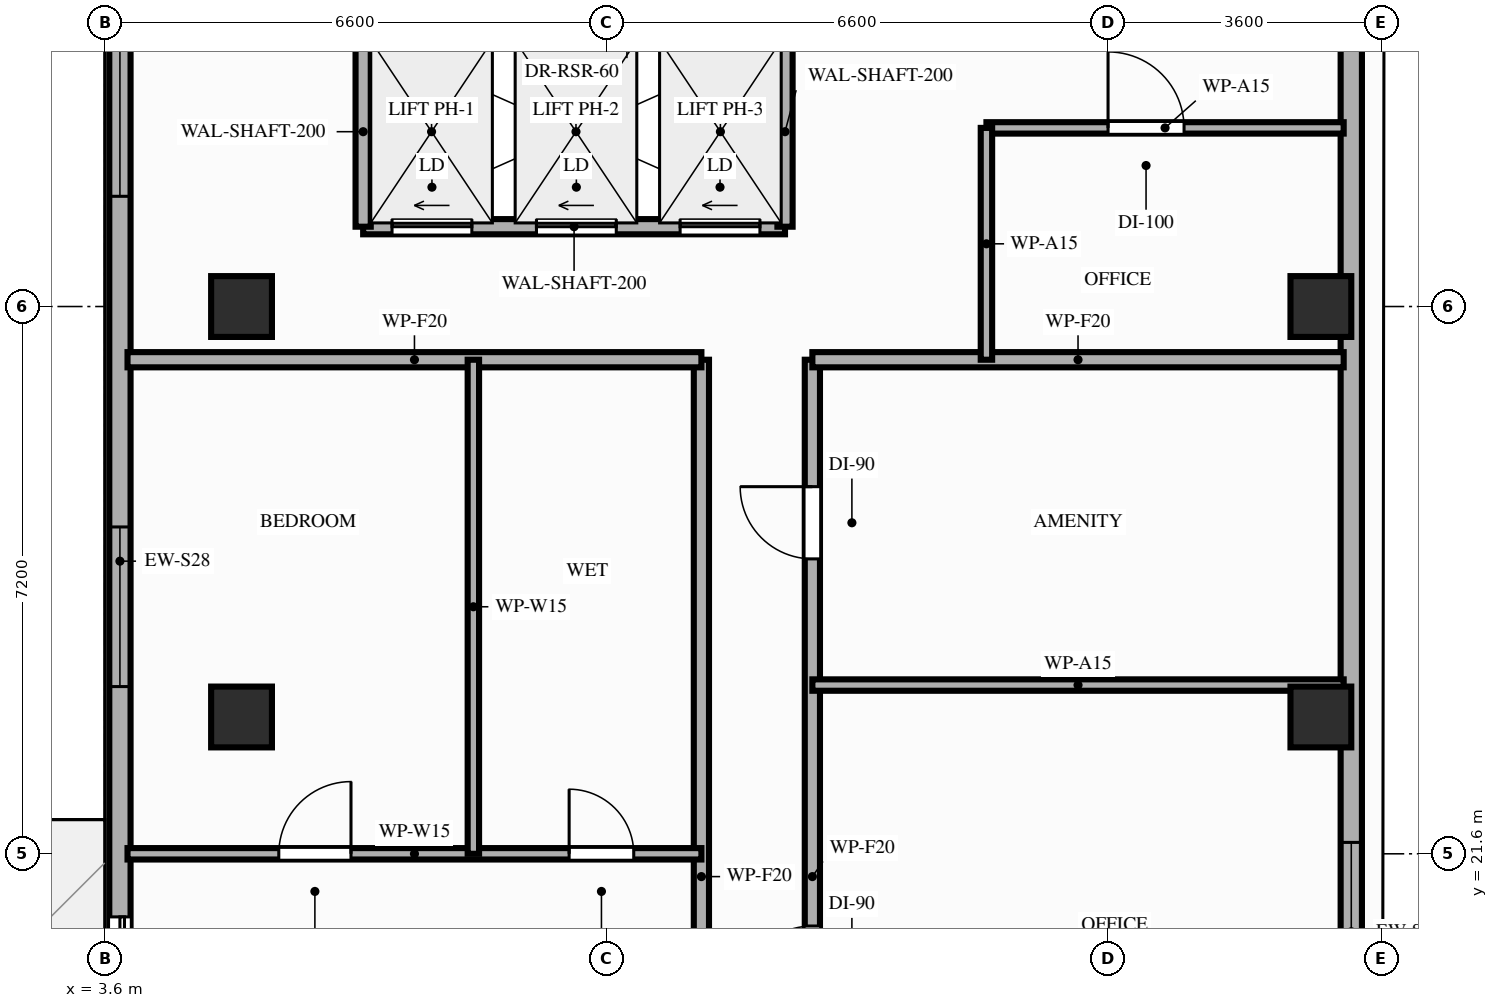
"""IFC4 building model, lengths in metres.
Left out: names, types, materials, properties, quantities, classifications, styles, units other than length and angle.
Written with IfcOpenShell. Run it as: python <this file> out.ifc"""

import sys

from ifc_helpers import new_model, si_unit, direction, frame, frame_2d, origin, origin_2d, place, context, subcontext, project, spatial, rectangle, extrude, element, fill, save


model = new_model("IFC4")
c1 = context("Model", 3, precision=1e-05, world=origin(), true_north=direction((0.0, 1.0)))
c2 = subcontext(c1, "Body", "Model", "MODEL_VIEW")
j1 = project(units=[si_unit("LENGTHUNIT", "METRE"), si_unit("PLANEANGLEUNIT", "RADIAN")], contexts=[c1])
p1 = place(None, origin())
s1 = spatial("IfcSite", under=j1, at=p1, CompositionType="ELEMENT")
p2 = place(p1, origin())
s2 = spatial("IfcBuilding", under=s1, at=p2, CompositionType="ELEMENT")
p3 = place(p2, frame((0.0, 0.0, 224.8)))
s3 = spatial("IfcBuildingStorey", under=s2, at=p3, CompositionType="ELEMENT", Elevation=224.8)
for number, where, z_axis, x_axis in (
    (1, (5.4, 23.4, 0.0), (0.0, 0.0, 1.0), (1.0, 0.0, 0.0)),
    (2, (19.6, 23.4, 0.0), (0.0, 0.0, 1.0), (1.0, 0.0, 0.0)),
    (3, (5.4, 28.8, 0.0), (0.0, 0.0, 1.0), (1.0, 0.0, 0.0)),
    (4, (19.6, 28.8, 0.0), (0.0, 0.0, 1.0), (1.0, 0.0, 0.0)),
):
    element("IfcColumn", number, at=place(p3, frame(where, z_axis=z_axis, x_axis=x_axis)), inside=s3, PredefinedType="COLUMN", context=c2, shape_type="SweptSolid", body=[
        extrude(rectangle(XDim=0.8, YDim=0.8, at=origin_2d()), origin(), (0.0, 0.0, 1.0), 3.2),
    ])
p4 = place(p3, frame((3.8, 42.1, 0.0), z_axis=(0.0, 0.0, 1.0), x_axis=(0.0, -1.0, 0.0)))
e5 = element("IfcWall", 5, at=p4, inside=s3, PredefinedType="STANDARD", context=c2, shape_type="SweptSolid", body=[
    extrude(rectangle(XDim=33.3, YDim=0.28, at=frame_2d((16.65, 0.0))), origin(), (0.0, 0.0, 1.0), 2.71),
])
p5 = place(p4, frame((21.33, 0.0, 0.0)))
e6 = element("IfcOpeningElement", 6, at=p5, cuts=e5, PredefinedType="OPENING", context=c2, shape_type="SweptSolid", body=[
    extrude(rectangle(XDim=1.4, YDim=2.1, at=frame_2d((0.7, 1.05))), frame((0.0, 0.15, 0.0), z_axis=(0.0, -1.0, 0.0), x_axis=(1.0, 0.0, 0.0)), (0.0, 0.0, 1.0), 0.3),
])
p6 = place(p4, frame((29.33, 0.0, 0.85)))
e7 = element("IfcOpeningElement", 7, at=p6, cuts=e5, PredefinedType="OPENING", context=c2, shape_type="SweptSolid", body=[
    extrude(rectangle(XDim=2.1, YDim=1.61, at=frame_2d((1.05, 0.805))), frame((0.0, 0.15, 0.0), z_axis=(0.0, -1.0, 0.0), x_axis=(1.0, 0.0, 0.0)), (0.0, 0.0, 1.0), 0.3),
])
p7 = place(p4, frame((16.2, 0.0, 0.85)))
e8 = element("IfcOpeningElement", 8, at=p7, cuts=e5, PredefinedType="OPENING", context=c2, shape_type="SweptSolid", body=[
    extrude(rectangle(XDim=2.1, YDim=1.61, at=frame_2d((1.05, 0.805))), frame((0.0, 0.15, 0.0), z_axis=(0.0, -1.0, 0.0), x_axis=(1.0, 0.0, 0.0)), (0.0, 0.0, 1.0), 0.3),
])
p8 = place(p4, frame((25.25, 0.0, 0.85)))
e9 = element("IfcOpeningElement", 9, at=p8, cuts=e5, PredefinedType="OPENING", context=c2, shape_type="SweptSolid", body=[
    extrude(rectangle(XDim=2.1, YDim=1.61, at=frame_2d((1.05, 0.805))), frame((0.0, 0.15, 0.0), z_axis=(0.0, -1.0, 0.0), x_axis=(1.0, 0.0, 0.0)), (0.0, 0.0, 1.0), 0.3),
])
p9 = place(p4, frame((9.75, 0.0, 0.85)))
e10 = element("IfcOpeningElement", 10, at=p9, cuts=e5, PredefinedType="OPENING", context=c2, shape_type="SweptSolid", body=[
    extrude(rectangle(XDim=2.1, YDim=1.61, at=frame_2d((1.05, 0.805))), frame((0.0, 0.15, 0.0), z_axis=(0.0, -1.0, 0.0), x_axis=(1.0, 0.0, 0.0)), (0.0, 0.0, 1.0), 0.3),
])
p10 = place(p4, frame((3.65, 0.0, 0.85)))
e11 = element("IfcOpeningElement", 11, at=p10, cuts=e5, PredefinedType="OPENING", context=c2, shape_type="SweptSolid", body=[
    extrude(rectangle(XDim=2.1, YDim=1.61, at=frame_2d((1.05, 0.805))), frame((0.0, 0.15, 0.0), z_axis=(0.0, -1.0, 0.0), x_axis=(1.0, 0.0, 0.0)), (0.0, 0.0, 1.0), 0.3),
])
p11 = place(p3, frame((20.0, 8.8, 0.0), z_axis=(0.0, 0.0, 1.0), x_axis=(0.0, 1.0, 0.0)))
e12 = element("IfcWall", 12, at=p11, inside=s3, PredefinedType="STANDARD", context=c2, shape_type="SweptSolid", body=[
    extrude(rectangle(XDim=23.55, YDim=0.28, at=frame_2d((11.775, 0.0))), origin(), (0.0, 0.0, 1.0), 2.51),
])
p12 = place(p11, frame((4.58, 0.0, 0.85)))
e13 = element("IfcOpeningElement", 13, at=p12, cuts=e12, PredefinedType="OPENING", context=c2, shape_type="SweptSolid", body=[
    extrude(rectangle(XDim=0.8, YDim=1.41, at=frame_2d((0.4, 0.705))), frame((0.0, 0.15, 0.0), z_axis=(0.0, -1.0, 0.0), x_axis=(1.0, 0.0, 0.0)), (0.0, 0.0, 1.0), 0.3),
])
p13 = place(p11, frame((5.95, 0.0, 0.85)))
e14 = element("IfcOpeningElement", 14, at=p13, cuts=e12, PredefinedType="OPENING", context=c2, shape_type="SweptSolid", body=[
    extrude(rectangle(XDim=1.5, YDim=1.41, at=frame_2d((0.75, 0.705))), frame((0.0, 0.15, 0.0), z_axis=(0.0, -1.0, 0.0), x_axis=(1.0, 0.0, 0.0)), (0.0, 0.0, 1.0), 0.3),
])
p14 = place(p11, frame((10.85, 0.0, 0.85)))
e15 = element("IfcOpeningElement", 15, at=p14, cuts=e12, PredefinedType="OPENING", context=c2, shape_type="SweptSolid", body=[
    extrude(rectangle(XDim=2.1, YDim=1.41, at=frame_2d((1.05, 0.705))), frame((0.0, 0.15, 0.0), z_axis=(0.0, -1.0, 0.0), x_axis=(1.0, 0.0, 0.0)), (0.0, 0.0, 1.0), 0.3),
])
p15 = place(p3, frame((7.0, 29.85, 0.0), z_axis=(0.0, 0.0, 1.0), x_axis=(1.0, 0.0, 0.0)))
e16 = element("IfcWall", 16, at=p15, inside=s3, PredefinedType="MOVABLE", context=c2, shape_type="SweptSolid", body=[
    extrude(rectangle(XDim=5.55, YDim=0.2, at=frame_2d((2.775, 0.0))), origin(), (0.0, 0.0, 1.0), 3.02),
])
p16 = place(p15, frame((0.38, 0.0, 0.0)))
e17 = element("IfcOpeningElement", 17, at=p16, cuts=e16, PredefinedType="OPENING", context=c2, shape_type="SweptSolid", body=[
    extrude(rectangle(XDim=1.05, YDim=2.15, at=frame_2d((0.525, 1.075))), frame((0.0, 0.11, 0.0), z_axis=(0.0, -1.0, 0.0), x_axis=(1.0, 0.0, 0.0)), (0.0, 0.0, 1.0), 0.22),
])
p17 = place(p15, frame((2.28, 0.0, 0.0)))
e18 = element("IfcOpeningElement", 18, at=p17, cuts=e16, PredefinedType="OPENING", context=c2, shape_type="SweptSolid", body=[
    extrude(rectangle(XDim=1.05, YDim=2.15, at=frame_2d((0.525, 1.075))), frame((0.0, 0.11, 0.0), z_axis=(0.0, -1.0, 0.0), x_axis=(1.0, 0.0, 0.0)), (0.0, 0.0, 1.0), 0.22),
])
p18 = place(p15, frame((4.17, 0.0, 0.0)))
e19 = element("IfcOpeningElement", 19, at=p18, cuts=e16, PredefinedType="OPENING", context=c2, shape_type="SweptSolid", body=[
    extrude(rectangle(XDim=1.05, YDim=2.15, at=frame_2d((0.525, 1.075))), frame((0.0, 0.11, 0.0), z_axis=(0.0, -1.0, 0.0), x_axis=(1.0, 0.0, 0.0)), (0.0, 0.0, 1.0), 0.22),
])
for number, where, z_axis, x_axis in (
    (20, (7.0, 29.85, 0.0), (0.0, 0.0, 1.0), (0.0, 1.0, 0.0)),
    (21, (12.55, 29.85, 0.0), (0.0, 0.0, 1.0), (0.0, 1.0, 0.0)),
):
    element("IfcWall", number, at=place(p3, frame(where, z_axis=z_axis, x_axis=x_axis)), inside=s3, PredefinedType="MOVABLE", context=c2, shape_type="SweptSolid", body=[
        extrude(rectangle(XDim=2.5, YDim=0.2, at=frame_2d((1.25, 0.0))), origin(), (0.0, 0.0, 1.0), 3.02),
    ])
p19 = place(p3, frame((11.45, 14.5, 0.0), z_axis=(0.0, 0.0, 1.0), x_axis=(0.0, 1.0, 0.0)))
e22 = element("IfcWall", 22, at=p19, inside=s3, PredefinedType="PARTITIONING", context=c2, shape_type="SweptSolid", body=[
    extrude(rectangle(XDim=13.6, YDim=0.2, at=frame_2d((6.8, 0.0))), origin(), (0.0, 0.0, 1.0), 2.51),
])
p20 = place(p19, frame((4.22, 0.0, 0.0)))
e23 = element("IfcOpeningElement", 23, at=p20, cuts=e22, PredefinedType="OPENING", context=c2, shape_type="SweptSolid", body=[
    extrude(rectangle(XDim=0.95, YDim=2.15, at=frame_2d((0.475, 1.075))), frame((0.0, 0.11, 0.0), z_axis=(0.0, -1.0, 0.0), x_axis=(1.0, 0.0, 0.0)), (0.0, 0.0, 1.0), 0.22),
])
p21 = place(p3, frame((12.91, 14.5, 0.0), z_axis=(0.0, 0.0, 1.0), x_axis=(0.0, 1.0, 0.0)))
e24 = element("IfcWall", 24, at=p21, inside=s3, PredefinedType="PARTITIONING", context=c2, shape_type="SweptSolid", body=[
    extrude(rectangle(XDim=13.6, YDim=0.2, at=frame_2d((6.8, 0.0))), origin(), (0.0, 0.0, 1.0), 2.51),
])
p22 = place(p21, frame((0.42, 0.0, 0.0)))
e25 = element("IfcOpeningElement", 25, at=p22, cuts=e24, PredefinedType="OPENING", context=c2, shape_type="SweptSolid", body=[
    extrude(rectangle(XDim=0.95, YDim=2.1, at=frame_2d((0.475, 1.05))), frame((0.0, 0.11, 0.0), z_axis=(0.0, -1.0, 0.0), x_axis=(1.0, 0.0, 0.0)), (0.0, 0.0, 1.0), 0.22),
])
p23 = place(p21, frame((5.2, 0.0, 0.0)))
e26 = element("IfcOpeningElement", 26, at=p23, cuts=e24, PredefinedType="OPENING", context=c2, shape_type="SweptSolid", body=[
    extrude(rectangle(XDim=0.95, YDim=2.15, at=frame_2d((0.475, 1.075))), frame((0.0, 0.11, 0.0), z_axis=(0.0, -1.0, 0.0), x_axis=(1.0, 0.0, 0.0)), (0.0, 0.0, 1.0), 0.22),
])
p24 = place(p21, frame((10.98, 0.0, 0.0)))
e27 = element("IfcOpeningElement", 27, at=p24, cuts=e24, PredefinedType="OPENING", context=c2, shape_type="SweptSolid", body=[
    extrude(rectangle(XDim=0.95, YDim=2.15, at=frame_2d((0.475, 1.075))), frame((0.0, 0.11, 0.0), z_axis=(0.0, -1.0, 0.0), x_axis=(1.0, 0.0, 0.0)), (0.0, 0.0, 1.0), 0.22),
])
p25 = place(p3, frame((3.9, 28.1, 0.0), z_axis=(0.0, 0.0, 1.0), x_axis=(1.0, 0.0, 0.0)))
e28 = element("IfcWall", 28, at=p25, inside=s3, PredefinedType="PARTITIONING", context=c2, shape_type="SweptSolid", body=[
    extrude(rectangle(XDim=7.55, YDim=0.2, at=frame_2d((3.775, 0.0))), origin(), (0.0, 0.0, 1.0), 2.51),
])
p26 = place(p3, frame((12.91, 28.1, 0.0), z_axis=(0.0, 0.0, 1.0), x_axis=(1.0, 0.0, 0.0)))
e29 = element("IfcWall", 29, at=p26, inside=s3, PredefinedType="PARTITIONING", context=c2, shape_type="SweptSolid", body=[
    extrude(rectangle(XDim=6.99, YDim=0.2, at=frame_2d((3.495, 0.0))), origin(), (0.0, 0.0, 1.0), 2.51),
])
p27 = place(p3, frame((15.2, 31.15, 0.0), z_axis=(0.0, 0.0, 1.0), x_axis=(1.0, 0.0, 0.0)))
e30 = element("IfcWall", 30, at=p27, inside=s3, PredefinedType="PARTITIONING", context=c2, shape_type="SweptSolid", body=[
    extrude(rectangle(XDim=4.7, YDim=0.15, at=frame_2d((2.35, 0.0))), origin(), (0.0, 0.0, 1.0), 2.51),
])
p28 = place(p27, frame((1.6, 0.0, 0.0)))
e31 = element("IfcOpeningElement", 31, at=p28, cuts=e30, PredefinedType="OPENING", context=c2, shape_type="SweptSolid", body=[
    extrude(rectangle(XDim=1.0, YDim=2.15, at=frame_2d((0.5, 1.075))), frame((0.0, 0.085, 0.0), z_axis=(0.0, -1.0, 0.0), x_axis=(1.0, 0.0, 0.0)), (0.0, 0.0, 1.0), 0.17),
])
p29 = place(p3, frame((15.2, 28.1, 0.0), z_axis=(0.0, 0.0, 1.0), x_axis=(0.0, 1.0, 0.0)))
e32 = element("IfcWall", 32, at=p29, inside=s3, PredefinedType="PARTITIONING", context=c2, shape_type="SweptSolid", body=[
    extrude(rectangle(XDim=3.05, YDim=0.15, at=frame_2d((1.525, 0.0))), origin(), (0.0, 0.0, 1.0), 2.51),
])
p30 = place(p3, frame((3.9, 21.6, 0.0), z_axis=(0.0, 0.0, 1.0), x_axis=(1.0, 0.0, 0.0)))
e33 = element("IfcWall", 33, at=p30, inside=s3, PredefinedType="PARTITIONING", context=c2, shape_type="SweptSolid", body=[
    extrude(rectangle(XDim=7.55, YDim=0.15, at=frame_2d((3.775, 0.0))), origin(), (0.0, 0.0, 1.0), 2.51),
])
p31 = place(p30, frame((1.99, 0.0, 0.0)))
e34 = element("IfcOpeningElement", 34, at=p31, cuts=e33, PredefinedType="OPENING", context=c2, shape_type="SweptSolid", body=[
    extrude(rectangle(XDim=0.95, YDim=2.15, at=frame_2d((0.475, 1.075))), frame((0.0, 0.085, 0.0), z_axis=(0.0, -1.0, 0.0), x_axis=(1.0, 0.0, 0.0)), (0.0, 0.0, 1.0), 0.17),
])
p32 = place(p30, frame((5.81, 0.0, 0.0)))
e35 = element("IfcOpeningElement", 35, at=p32, cuts=e33, PredefinedType="OPENING", context=c2, shape_type="SweptSolid", body=[
    extrude(rectangle(XDim=0.85, YDim=2.1, at=frame_2d((0.425, 1.05))), frame((0.0, 0.085, 0.0), z_axis=(0.0, -1.0, 0.0), x_axis=(1.0, 0.0, 0.0)), (0.0, 0.0, 1.0), 0.17),
])
p33 = place(p3, frame((8.45, 21.6, 0.0), z_axis=(0.0, 0.0, 1.0), x_axis=(0.0, 1.0, 0.0)))
e36 = element("IfcWall", 36, at=p33, inside=s3, PredefinedType="PARTITIONING", context=c2, shape_type="SweptSolid", body=[
    extrude(rectangle(XDim=6.5, YDim=0.15, at=frame_2d((3.25, 0.0))), origin(), (0.0, 0.0, 1.0), 2.51),
])
p34 = place(p3, frame((12.91, 23.82, 0.0), z_axis=(0.0, 0.0, 1.0), x_axis=(1.0, 0.0, 0.0)))
e37 = element("IfcWall", 37, at=p34, inside=s3, PredefinedType="PARTITIONING", context=c2, shape_type="SweptSolid", body=[
    extrude(rectangle(XDim=6.99, YDim=0.15, at=frame_2d((3.495, 0.0))), origin(), (0.0, 0.0, 1.0), 2.51),
])
p35 = place(p5, origin())
e38 = element("IfcDoor", 38, at=p35, inside=s3, OperationType="SLIDING_TO_RIGHT", PredefinedType="DOOR", context=c2, shape_type="SweptSolid", body=[
    extrude(rectangle(XDim=1.4, YDim=2.1, at=frame_2d((0.7, 1.05))), frame((0.0, 0.025, 0.0), z_axis=(0.0, -1.0, 0.0), x_axis=(1.0, 0.0, 0.0)), (0.0, 0.0, 1.0), 0.05),
])
fill(e6, e38)
p36 = place(p7, origin())
e39 = element("IfcWindow", 39, at=p36, inside=s3, PartitioningType="SINGLE_PANEL", PredefinedType="WINDOW", context=c2, shape_type="SweptSolid", body=[
    extrude(rectangle(XDim=2.1, YDim=1.61, at=frame_2d((1.05, 0.805))), frame((0.0, 0.03, 0.0), z_axis=(0.0, -1.0, 0.0), x_axis=(1.0, 0.0, 0.0)), (0.0, 0.0, 1.0), 0.06),
])
fill(e8, e39)
p37 = place(p9, origin())
e40 = element("IfcWindow", 40, at=p37, inside=s3, PartitioningType="SINGLE_PANEL", PredefinedType="WINDOW", context=c2, shape_type="SweptSolid", body=[
    extrude(rectangle(XDim=2.1, YDim=1.61, at=frame_2d((1.05, 0.805))), frame((0.0, 0.03, 0.0), z_axis=(0.0, -1.0, 0.0), x_axis=(1.0, 0.0, 0.0)), (0.0, 0.0, 1.0), 0.06),
])
fill(e10, e40)
p38 = place(p14, origin())
e41 = element("IfcWindow", 41, at=p38, inside=s3, PartitioningType="SINGLE_PANEL", PredefinedType="WINDOW", context=c2, shape_type="SweptSolid", body=[
    extrude(rectangle(XDim=2.1, YDim=1.41, at=frame_2d((1.05, 0.705))), frame((0.0, 0.03, 0.0), z_axis=(0.0, -1.0, 0.0), x_axis=(1.0, 0.0, 0.0)), (0.0, 0.0, 1.0), 0.06),
])
fill(e15, e41)
p39 = place(p16, origin())
e42 = element("IfcDoor", 42, at=p39, inside=s3, OperationType="SLIDING_TO_LEFT", PredefinedType="DOOR", context=c2, shape_type="SweptSolid", body=[
    extrude(rectangle(XDim=1.05, YDim=2.15, at=frame_2d((0.525, 1.075))), frame((0.0, 0.025, 0.0), z_axis=(0.0, -1.0, 0.0), x_axis=(1.0, 0.0, 0.0)), (0.0, 0.0, 1.0), 0.05),
])
fill(e17, e42)
p40 = place(p17, origin())
e43 = element("IfcDoor", 43, at=p40, inside=s3, OperationType="SLIDING_TO_LEFT", PredefinedType="DOOR", context=c2, shape_type="SweptSolid", body=[
    extrude(rectangle(XDim=1.05, YDim=2.15, at=frame_2d((0.525, 1.075))), frame((0.0, 0.025, 0.0), z_axis=(0.0, -1.0, 0.0), x_axis=(1.0, 0.0, 0.0)), (0.0, 0.0, 1.0), 0.05),
])
fill(e18, e43)
p41 = place(p18, origin())
e44 = element("IfcDoor", 44, at=p41, inside=s3, OperationType="SLIDING_TO_LEFT", PredefinedType="DOOR", context=c2, shape_type="SweptSolid", body=[
    extrude(rectangle(XDim=1.05, YDim=2.15, at=frame_2d((0.525, 1.075))), frame((0.0, 0.025, 0.0), z_axis=(0.0, -1.0, 0.0), x_axis=(1.0, 0.0, 0.0)), (0.0, 0.0, 1.0), 0.05),
])
fill(e19, e44)
p42 = place(p28, origin())
e45 = element("IfcDoor", 45, at=p42, inside=s3, OperationType="SINGLE_SWING_LEFT", PredefinedType="DOOR", context=c2, shape_type="SweptSolid", body=[
    extrude(rectangle(XDim=1.0, YDim=2.15, at=frame_2d((0.5, 1.075))), frame((0.0, 0.025, 0.0), z_axis=(0.0, -1.0, 0.0), x_axis=(1.0, 0.0, 0.0)), (0.0, 0.0, 1.0), 0.05),
])
fill(e31, e45)
p43 = place(p31, origin())
e46 = element("IfcDoor", 46, at=p43, inside=s3, OperationType="SINGLE_SWING_RIGHT", PredefinedType="DOOR", context=c2, shape_type="SweptSolid", body=[
    extrude(rectangle(XDim=0.95, YDim=2.15, at=frame_2d((0.475, 1.075))), frame((0.0, 0.025, 0.0), z_axis=(0.0, -1.0, 0.0), x_axis=(1.0, 0.0, 0.0)), (0.0, 0.0, 1.0), 0.05),
])
fill(e34, e46)
p44 = place(p32, origin())
e47 = element("IfcDoor", 47, at=p44, inside=s3, OperationType="SINGLE_SWING_LEFT", PredefinedType="DOOR", context=c2, shape_type="SweptSolid", body=[
    extrude(rectangle(XDim=0.85, YDim=2.1, at=frame_2d((0.425, 1.05))), frame((0.0, 0.025, 0.0), z_axis=(0.0, -1.0, 0.0), x_axis=(1.0, 0.0, 0.0)), (0.0, 0.0, 1.0), 0.05),
])
fill(e35, e47)
p45 = place(p23, origin())
e48 = element("IfcDoor", 48, at=p45, inside=s3, OperationType="SINGLE_SWING_LEFT", PredefinedType="DOOR", context=c2, shape_type="SweptSolid", body=[
    extrude(rectangle(XDim=0.95, YDim=2.15, at=frame_2d((0.475, 1.075))), frame((0.0, 0.025, 0.0), z_axis=(0.0, -1.0, 0.0), x_axis=(1.0, 0.0, 0.0)), (0.0, 0.0, 1.0), 0.05),
])
fill(e26, e48)
p46 = place(p24, origin())
e49 = element("IfcDoor", 49, at=p46, inside=s3, OperationType="SINGLE_SWING_RIGHT", PredefinedType="DOOR", context=c2, shape_type="SweptSolid", body=[
    extrude(rectangle(XDim=0.95, YDim=2.15, at=frame_2d((0.475, 1.075))), frame((0.0, 0.025, 0.0), z_axis=(0.0, -1.0, 0.0), x_axis=(1.0, 0.0, 0.0)), (0.0, 0.0, 1.0), 0.05),
])
fill(e27, e49)
save(model, sys.argv[1])
